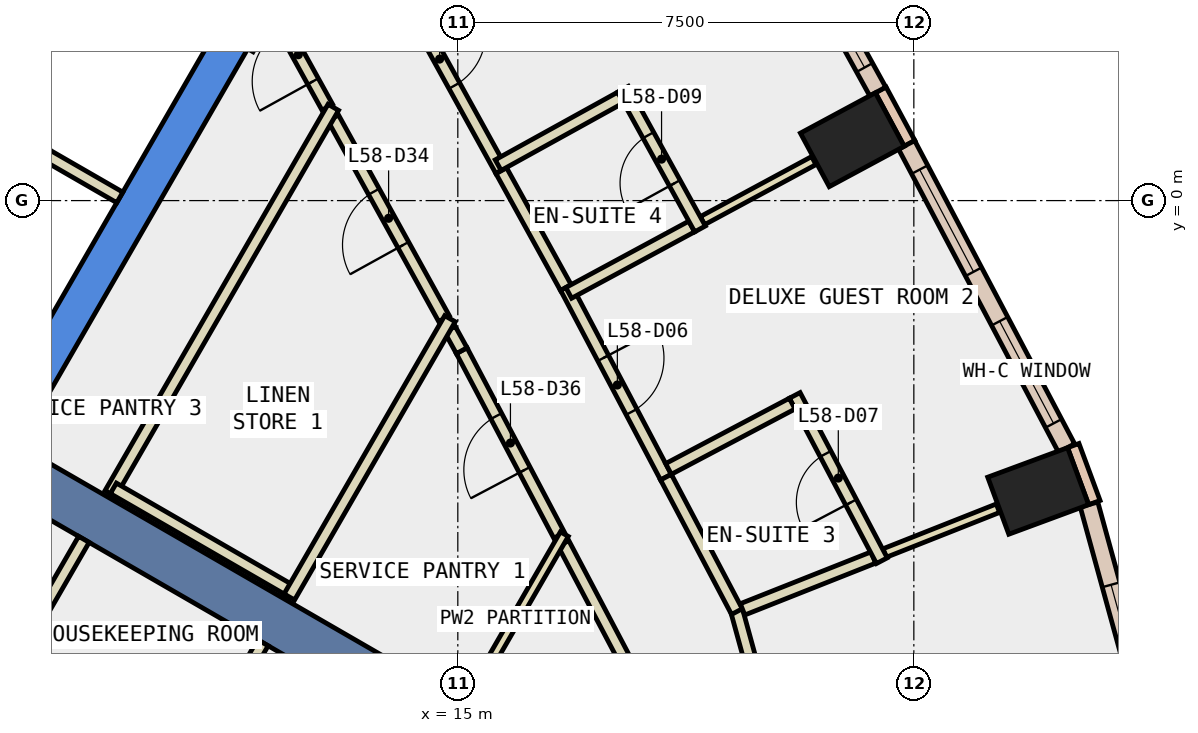
"""IFC4 building model, lengths in metres.
Left out: names, types, materials, properties, quantities, classifications, styles, units other than length and angle.
Written with IfcOpenShell. Run it as: python <this file> out.ifc"""

import sys

from ifc_helpers import new_model, si_unit, direction, frame, frame_2d, origin, origin_2d, place, context, subcontext, project, spatial, polyline, rectangle, outline, extrude, element, fill, save


model = new_model("IFC4")
c1 = context("Model", 3, precision=1e-05, world=origin(), true_north=direction((0.0, 1.0)))
c2 = subcontext(c1, "Body", "Model", "MODEL_VIEW")
j1 = project(units=[si_unit("LENGTHUNIT", "METRE"), si_unit("PLANEANGLEUNIT", "RADIAN")], contexts=[c1])
p1 = place(None, origin())
s1 = spatial("IfcSite", under=j1, at=p1, CompositionType="ELEMENT")
p2 = place(p1, origin())
s2 = spatial("IfcBuilding", under=s1, at=p2, CompositionType="ELEMENT")
p3 = place(p2, frame((0.0, 0.0, 255.8)))
s3 = spatial("IfcBuildingStorey", under=s2, at=p3, CompositionType="ELEMENT", Elevation=255.8)
for number, where, z_axis, x_axis in (
    (1, (24.545, -4.775, -0.34), (0.0, 0.0, 1.0), (-0.347, 0.938, 0.0)),
    (2, (21.488, 1.001, -0.34), (0.0, 0.0, 1.0), (-0.474, 0.881, 0.0)),
):
    element("IfcColumn", number, at=place(p3, frame(where, z_axis=z_axis, x_axis=x_axis)), inside=s3, PredefinedType="COLUMN", context=c2, shape_type="SweptSolid", body=[
        extrude(rectangle(XDim=1.0, YDim=1.4, at=origin_2d()), origin(), (0.0, 0.0, 1.0), 3.6),
    ])
p4 = place(p3, frame((0.0, 0.0, -0.34)))
e3 = element("IfcWall", 3, at=p4, inside=s3, PredefinedType="SHEAR", context=c2, shape_type="SweptSolid", body=[
    extrude(outline(polyline([(5.774, -7.5), (11.547, 2.5), (10.854, 2.5), (5.427, -6.9), (5.774, -7.5)])), origin(), (0.0, 0.0, 1.0), 3.6),
])
p5 = place(p3, frame((7.578, -4.375, -0.34), z_axis=(0.0, 0.0, 1.0), x_axis=(0.866024315419, -0.5000018851, 0.0)))
e4 = element("IfcWall", 4, at=p5, inside=s3, PredefinedType="SHEAR", context=c2, shape_type="SweptSolid", body=[
    extrude(rectangle(XDim=9.0, YDim=0.8, at=frame_2d((4.5, 0.0))), origin(), (0.0, 0.0, 1.0), 3.6),
])
p6 = place(p3, frame((25.469, -4.967, 0.0), z_axis=(0.0, 0.0, 1.0), x_axis=(-0.346892928577, 0.937904737222, 0.0)))
e5 = element("IfcWall", 5, at=p6, inside=s3, PredefinedType="STANDARD", context=c2, shape_type="SweptSolid", body=[
    extrude(rectangle(XDim=1.0, YDim=0.2, at=frame_2d((0.5, 0.0))), origin(), (0.0, 0.0, 1.0), 3.26),
])
p7 = place(p3, frame((22.429, 0.94, 0.0), z_axis=(0.0, 0.0, 1.0), x_axis=(-0.473663196434, 0.88070606694, 0.0)))
e6 = element("IfcWall", 6, at=p7, inside=s3, PredefinedType="STANDARD", context=c2, shape_type="SweptSolid", body=[
    extrude(rectangle(XDim=1.0, YDim=0.2, at=frame_2d((0.5, 0.0))), origin(), (0.0, 0.0, 1.0), 3.26),
])
p8 = place(p3, frame((26.477, -8.987, 0.0), z_axis=(0.0, 0.0, 1.0), x_axis=(-0.264924661919, 0.964269113633, 0.0)))
e7 = element("IfcWall", 7, at=p8, inside=s3, PredefinedType="STANDARD", context=c2, shape_type="SweptSolid", body=[
    extrude(rectangle(XDim=4.137, YDim=0.3, at=frame_2d((2.068, 0.0))), origin(), (0.0, 0.0, 1.0), 3.26),
])
p9 = place(p8, frame((1.368, 0.0, 0.9)))
e8 = element("IfcOpeningElement", 8, at=p9, cuts=e7, PredefinedType="OPENING", context=c2, shape_type="SweptSolid", body=[
    extrude(rectangle(XDim=1.4, YDim=2.0, at=frame_2d((0.7, 1.0))), frame((0.0, 0.16, 0.0), z_axis=(0.0, -1.0, 0.0), x_axis=(1.0, 0.0, 0.0)), (0.0, 0.0, 1.0), 0.32),
])
p10 = place(p3, frame((25.012, -4.07, 0.0), z_axis=(0.0, 0.0, 1.0), x_axis=(-0.466663589714, 0.884434900959, 0.0)))
e9 = element("IfcWall", 9, at=p10, inside=s3, PredefinedType="STANDARD", context=c2, shape_type="SweptSolid", body=[
    extrude(rectangle(XDim=5.638, YDim=0.3, at=frame_2d((2.819, 0.0))), origin(), (0.0, 0.0, 1.0), 3.26),
])
p11 = place(p10, frame((0.459, 0.0, 0.9)))
e10 = element("IfcOpeningElement", 10, at=p11, cuts=e9, PredefinedType="OPENING", context=c2, shape_type="SweptSolid", body=[
    extrude(rectangle(XDim=1.9, YDim=2.0, at=frame_2d((0.95, 1.0))), frame((0.0, 0.16, 0.0), z_axis=(0.0, -1.0, 0.0), x_axis=(1.0, 0.0, 0.0)), (0.0, 0.0, 1.0), 0.32),
])
p12 = place(p10, frame((3.278, 0.0, 0.9)))
e11 = element("IfcOpeningElement", 11, at=p12, cuts=e9, PredefinedType="OPENING", context=c2, shape_type="SweptSolid", body=[
    extrude(rectangle(XDim=1.9, YDim=2.0, at=frame_2d((0.95, 1.0))), frame((0.0, 0.16, 0.0), z_axis=(0.0, -1.0, 0.0), x_axis=(1.0, 0.0, 0.0)), (0.0, 0.0, 1.0), 0.32),
])
p13 = place(p3, frame((21.907, 1.794, 0.0), z_axis=(0.0, 0.0, 1.0), x_axis=(-0.483469062695, 0.875361448441, 0.0)))
e12 = element("IfcWall", 12, at=p13, inside=s3, PredefinedType="STANDARD", context=c2, shape_type="SweptSolid", body=[
    extrude(rectangle(XDim=5.601, YDim=0.3, at=frame_2d((2.801, 0.0))), origin(), (0.0, 0.0, 1.0), 3.26),
])
p14 = place(p13, frame((0.45, 0.0, 0.9)))
e13 = element("IfcOpeningElement", 13, at=p14, cuts=e12, PredefinedType="OPENING", context=c2, shape_type="SweptSolid", body=[
    extrude(rectangle(XDim=1.9, YDim=2.0, at=frame_2d((0.95, 1.0))), frame((0.0, 0.16, 0.0), z_axis=(0.0, -1.0, 0.0), x_axis=(1.0, 0.0, 0.0)), (0.0, 0.0, 1.0), 0.32),
])
p15 = place(p13, frame((3.251, 0.0, 0.9)))
e14 = element("IfcOpeningElement", 14, at=p15, cuts=e12, PredefinedType="OPENING", context=c2, shape_type="SweptSolid", body=[
    extrude(rectangle(XDim=1.9, YDim=2.0, at=frame_2d((0.95, 1.0))), frame((0.0, 0.16, 0.0), z_axis=(0.0, -1.0, 0.0), x_axis=(1.0, 0.0, 0.0)), (0.0, 0.0, 1.0), 0.32),
])
p16 = place(p3, frame((12.854, 1.535, 0.0), z_axis=(0.0, 0.0, 1.0), x_axis=(-0.483730980407, 0.875216738068, 0.0)))
e15 = element("IfcWall", 15, at=p16, inside=s3, PredefinedType="PARTITIONING", context=c2, shape_type="SweptSolid", body=[
    extrude(rectangle(XDim=1.974, YDim=0.2, at=frame_2d((0.987, 0.0))), origin(), (0.0, 0.0, 1.0), 3.26),
])
p17 = place(p16, frame((0.487, 0.0, 0.0)))
e16 = element("IfcOpeningElement", 16, at=p17, cuts=e15, PredefinedType="OPENING", context=c2, shape_type="SweptSolid", body=[
    extrude(rectangle(XDim=1.0, YDim=2.1, at=frame_2d((0.5, 1.05))), frame((0.0, 0.11, 0.0), z_axis=(0.0, -1.0, 0.0), x_axis=(1.0, 0.0, 0.0)), (0.0, 0.0, 1.0), 0.22),
])
p18 = place(p3, frame((11.893, 3.097, 0.0), z_axis=(0.0, 0.0, 1.0), x_axis=(-0.500911294014, -0.865498628265, 0.0)))
e17 = element("IfcWall", 17, at=p18, inside=s3, PredefinedType="PARTITIONING", context=c2, shape_type="SweptSolid", body=[
    extrude(rectangle(XDim=0.693, YDim=0.2, at=frame_2d((0.347, 0.0))), origin(), (0.0, 0.0, 1.0), 3.26),
])
p19 = place(p3, frame((14.773, -1.941, 0.0), z_axis=(0.0, 0.0, 1.0), x_axis=(-0.483431586589, 0.875382145744, 0.0)))
e18 = element("IfcWall", 18, at=p19, inside=s3, PredefinedType="PARTITIONING", context=c2, shape_type="SweptSolid", body=[
    extrude(rectangle(XDim=3.771, YDim=0.2, at=frame_2d((1.885, 0.0))), origin(), (0.0, 0.0, 1.0), 3.26),
])
p20 = place(p19, frame((1.385, 0.0, 0.0)))
e19 = element("IfcOpeningElement", 19, at=p20, cuts=e18, PredefinedType="OPENING", context=c2, shape_type="SweptSolid", body=[
    extrude(rectangle(XDim=1.0, YDim=2.1, at=frame_2d((0.5, 1.05))), frame((0.0, 0.11, 0.0), z_axis=(0.0, -1.0, 0.0), x_axis=(1.0, 0.0, 0.0)), (0.0, 0.0, 1.0), 0.22),
])
p21 = place(p3, frame((16.667, -5.505, 0.0), z_axis=(0.0, 0.0, 1.0), x_axis=(-0.466812680399, 0.884356218624, 0.0)))
e20 = element("IfcWall", 20, at=p21, inside=s3, PredefinedType="PARTITIONING", context=c2, shape_type="SweptSolid", body=[
    extrude(rectangle(XDim=3.434, YDim=0.2, at=frame_2d((1.717, 0.0))), origin(), (0.0, 0.0, 1.0), 3.26),
])
p22 = place(p21, frame((1.217, 0.0, 0.0)))
e21 = element("IfcOpeningElement", 21, at=p22, cuts=e20, PredefinedType="OPENING", context=c2, shape_type="SweptSolid", body=[
    extrude(rectangle(XDim=1.0, YDim=2.1, at=frame_2d((0.5, 1.05))), frame((0.0, 0.11, 0.0), z_axis=(0.0, -1.0, 0.0), x_axis=(1.0, 0.0, 0.0)), (0.0, 0.0, 1.0), 0.22),
])
p23 = place(p3, frame((15.064, -2.468, 0.0), z_axis=(0.0, 0.0, 1.0), x_axis=(-0.482338449744, 0.875984942735, 0.0)))
e22 = element("IfcWall", 22, at=p23, inside=s3, PredefinedType="PARTITIONING", context=c2, shape_type="SweptSolid", body=[
    extrude(rectangle(XDim=0.402, YDim=0.2, at=frame_2d((0.201, 0.0))), origin(), (0.0, 0.0, 1.0), 3.26),
])
p24 = place(p3, frame((17.766, -7.588, 0.0), z_axis=(0.0, 0.0, 1.0), x_axis=(-0.466727344864, 0.884401258228, 0.0)))
e23 = element("IfcWall", 23, at=p24, inside=s3, PredefinedType="PARTITIONING", context=c2, shape_type="SweptSolid", body=[
    extrude(rectangle(XDim=2.205, YDim=0.2, at=frame_2d((1.103, 0.0))), origin(), (0.0, 0.0, 1.0), 3.26),
])
p25 = place(p3, frame((19.564, -6.662, 0.0), z_axis=(0.0, 0.0, 1.0), x_axis=(0.264876135597, -0.96428244451, 0.0)))
e24 = element("IfcWall", 24, at=p25, inside=s3, PredefinedType="PARTITIONING", context=c2, shape_type="SweptSolid", body=[
    extrude(rectangle(XDim=3.077, YDim=0.2, at=frame_2d((1.538, 0.0))), origin(), (0.0, 0.0, 1.0), 3.26),
])
p26 = place(p3, frame((16.778, -1.429, 0.0), z_axis=(0.0, 0.0, 1.0), x_axis=(0.466493865945, -0.884524433261, 0.0)))
e25 = element("IfcWall", 25, at=p26, inside=s3, PredefinedType="PARTITIONING", context=c2, shape_type="SweptSolid", body=[
    extrude(rectangle(XDim=3.526, YDim=0.2, at=frame_2d((1.763, 0.0))), origin(), (0.0, 0.0, 1.0), 3.26),
])
p27 = place(p26, frame((1.313, 0.0, 0.0)))
e26 = element("IfcOpeningElement", 26, at=p27, cuts=e25, PredefinedType="OPENING", context=c2, shape_type="SweptSolid", body=[
    extrude(rectangle(XDim=1.0, YDim=2.1, at=frame_2d((0.5, 1.05))), frame((0.0, 0.11, 0.0), z_axis=(0.0, -1.0, 0.0), x_axis=(1.0, 0.0, 0.0)), (0.0, 0.0, 1.0), 0.22),
])
p28 = place(p3, frame((18.423, -4.548, 0.0), z_axis=(0.0, 0.0, 1.0), x_axis=(0.466792565793, -0.884366835946, 0.0)))
e27 = element("IfcWall", 27, at=p28, inside=s3, PredefinedType="PARTITIONING", context=c2, shape_type="SweptSolid", body=[
    extrude(rectangle(XDim=2.5, YDim=0.2, at=frame_2d((1.25, 0.0))), origin(), (0.0, 0.0, 1.0), 3.26),
])
p29 = place(p3, frame((13.641, 4.246, 0.0), z_axis=(0.0, 0.0, 1.0), x_axis=(0.483405752983, -0.875396411909, 0.0)))
e28 = element("IfcWall", 28, at=p29, inside=s3, PredefinedType="PARTITIONING", context=c2, shape_type="SweptSolid", body=[
    extrude(rectangle(XDim=4.284, YDim=0.2, at=frame_2d((2.142, 0.0))), origin(), (0.0, 0.0, 1.0), 3.26),
])
p30 = place(p29, frame((1.692, 0.0, 0.0)))
e29 = element("IfcOpeningElement", 29, at=p30, cuts=e28, PredefinedType="OPENING", context=c2, shape_type="SweptSolid", body=[
    extrude(rectangle(XDim=1.0, YDim=2.1, at=frame_2d((0.5, 1.05))), frame((0.0, 0.11, 0.0), z_axis=(0.0, -1.0, 0.0), x_axis=(1.0, 0.0, 0.0)), (0.0, 0.0, 1.0), 0.22),
])
p31 = place(p3, frame((15.715, 0.491, 0.0), z_axis=(0.0, 0.0, 1.0), x_axis=(0.483421428323, -0.875387755591, 0.0)))
e30 = element("IfcWall", 30, at=p31, inside=s3, PredefinedType="PARTITIONING", context=c2, shape_type="SweptSolid", body=[
    extrude(rectangle(XDim=2.194, YDim=0.2, at=frame_2d((1.097, 0.0))), origin(), (0.0, 0.0, 1.0), 3.26),
])
p32 = place(p3, frame((8.141, 0.801, 0.0), z_axis=(0.0, 0.0, 1.0), x_axis=(0.866434738017, -0.499290341141, 0.0)))
e31 = element("IfcWall", 31, at=p32, inside=s3, PredefinedType="PARTITIONING", context=c2, shape_type="SweptSolid", body=[
    extrude(rectangle(XDim=1.5, YDim=0.2, at=frame_2d((0.75, 0.0))), origin(), (0.0, 0.0, 1.0), 3.26),
])
p33 = place(p3, frame((7.8, -7.39, 0.0), z_axis=(0.0, 0.0, 1.0), x_axis=(0.499977374825, 0.866038466041, 0.0)))
e32 = element("IfcWall", 32, at=p33, inside=s3, PredefinedType="PARTITIONING", context=c2, shape_type="SweptSolid", body=[
    extrude(rectangle(XDim=2.1, YDim=0.2, at=frame_2d((1.05, 0.0))), origin(), (0.0, 0.0, 1.0), 3.26),
])
p34 = place(p3, frame((9.285, -4.818, 0.0), z_axis=(0.0, 0.0, 1.0), x_axis=(0.499962569651, 0.866047013128, 0.0)))
e33 = element("IfcWall", 33, at=p34, inside=s3, PredefinedType="PARTITIONING", context=c2, shape_type="SweptSolid", body=[
    extrude(rectangle(XDim=7.334, YDim=0.2, at=frame_2d((3.667, 0.0))), origin(), (0.0, 0.0, 1.0), 3.26),
])
p35 = place(p3, frame((9.335, -4.732, 0.0), z_axis=(0.0, 0.0, 1.0), x_axis=(0.866002606077, -0.500039484709, 0.0)))
e34 = element("IfcWall", 34, at=p35, inside=s3, PredefinedType="PARTITIONING", context=c2, shape_type="SweptSolid", body=[
    extrude(rectangle(XDim=3.4, YDim=0.2, at=frame_2d((1.7, 0.0))), origin(), (0.0, 0.0, 1.0), 3.26),
])
p36 = place(p3, frame((11.794, -7.271, 0.0), z_axis=(0.0, 0.0, 1.0), x_axis=(-0.499918457185, -0.866072477433, 0.0)))
e35 = element("IfcWall", 35, at=p36, inside=s3, PredefinedType="PARTITIONING", context=c2, shape_type="SweptSolid", body=[
    extrude(rectangle(XDim=5.607, YDim=0.2, at=frame_2d((2.803, 0.0))), origin(), (0.0, 0.0, 1.0), 3.26),
])
p37 = place(p3, frame((14.871, -1.942, 0.0), z_axis=(0.0, 0.0, 1.0), x_axis=(-0.50000507839, -0.866022471755, 0.0)))
e36 = element("IfcWall", 36, at=p37, inside=s3, PredefinedType="PARTITIONING", context=c2, shape_type="SweptSolid", body=[
    extrude(rectangle(XDim=5.284, YDim=0.2, at=frame_2d((2.642, 0.0))), origin(), (0.0, 0.0, 1.0), 3.26),
])
p38 = place(p3, frame((16.752, -5.485, 0.0), z_axis=(0.0, 0.0, 1.0), x_axis=(-0.499988848364, -0.866031842089, 0.0)))
e37 = element("IfcWall", 37, at=p38, inside=s3, PredefinedType="PARTITIONING", context=c2, shape_type="SweptSolid", body=[
    extrude(rectangle(XDim=3.226, YDim=0.15, at=frame_2d((1.613, 0.0))), origin(), (0.0, 0.0, 1.0), 3.26),
])
p39 = place(p3, frame((22.02, -5.796, 0.0), z_axis=(0.0, 0.0, 1.0), x_axis=(0.929915172208, 0.367774078066, 0.0)))
e38 = element("IfcWall", 38, at=p39, inside=s3, PredefinedType="PARTITIONING", context=c2, shape_type="SweptSolid", body=[
    extrude(rectangle(XDim=2.003, YDim=0.15, at=frame_2d((1.002, 0.0))), origin(), (0.0, 0.0, 1.0), 3.26),
])
p40 = place(p3, frame((19.683, -6.722, 0.0), z_axis=(0.0, 0.0, 1.0), x_axis=(0.929744903847, 0.368204309821, 0.0)))
e39 = element("IfcWall", 39, at=p40, inside=s3, PredefinedType="PARTITIONING", context=c2, shape_type="SweptSolid", body=[
    extrude(rectangle(XDim=2.313, YDim=0.2, at=frame_2d((1.157, 0.0))), origin(), (0.0, 0.0, 1.0), 3.26),
])
p41 = place(p3, frame((21.974, -5.922, 0.0), z_axis=(0.0, 0.0, 1.0), x_axis=(-0.466401249432, 0.88457327256, 0.0)))
e40 = element("IfcWall", 40, at=p41, inside=s3, PredefinedType="PARTITIONING", context=c2, shape_type="SweptSolid", body=[
    extrude(rectangle(XDim=3.073, YDim=0.2, at=frame_2d((1.536, 0.0))), origin(), (0.0, 0.0, 1.0), 3.26),
])
p42 = place(p41, frame((1.086, 0.0, 0.0)))
e41 = element("IfcOpeningElement", 41, at=p42, cuts=e40, PredefinedType="OPENING", context=c2, shape_type="SweptSolid", body=[
    extrude(rectangle(XDim=0.9, YDim=2.1, at=frame_2d((0.45, 1.05))), frame((0.0, 0.11, 0.0), z_axis=(0.0, -1.0, 0.0), x_axis=(1.0, 0.0, 0.0)), (0.0, 0.0, 1.0), 0.22),
])
p43 = place(p3, frame((20.499, -3.339, 0.0), z_axis=(0.0, 0.0, 1.0), x_axis=(-0.884293452572, -0.466931568583, 0.0)))
e42 = element("IfcWall", 42, at=p43, inside=s3, PredefinedType="PARTITIONING", context=c2, shape_type="SweptSolid", body=[
    extrude(rectangle(XDim=2.3, YDim=0.2, at=frame_2d((1.15, 0.0))), origin(), (0.0, 0.0, 1.0), 3.26),
])
p44 = place(p3, frame((19.023, -0.33, 0.0), z_axis=(0.0, 0.0, 1.0), x_axis=(0.880158309515, 0.474680261009, 0.0)))
e43 = element("IfcWall", 43, at=p44, inside=s3, PredefinedType="PARTITIONING", context=c2, shape_type="SweptSolid", body=[
    extrude(rectangle(XDim=2.082, YDim=0.15, at=frame_2d((1.041, 0.0))), origin(), (0.0, 0.0, 1.0), 3.26),
])
p45 = place(p3, frame((16.824, -1.518, 0.0), z_axis=(0.0, 0.0, 1.0), x_axis=(0.87996932648, 0.475030508972, 0.0)))
e44 = element("IfcWall", 44, at=p45, inside=s3, PredefinedType="PARTITIONING", context=c2, shape_type="SweptSolid", body=[
    extrude(rectangle(XDim=2.299, YDim=0.2, at=frame_2d((1.149, 0.0))), origin(), (0.0, 0.0, 1.0), 3.26),
])
p46 = place(p3, frame((18.984, -0.466, 0.0), z_axis=(0.0, 0.0, 1.0), x_axis=(-0.482922337539, 0.875663186337, 0.0)))
e45 = element("IfcWall", 45, at=p46, inside=s3, PredefinedType="PARTITIONING", context=c2, shape_type="SweptSolid", body=[
    extrude(rectangle(XDim=2.623, YDim=0.2, at=frame_2d((1.312, 0.0))), origin(), (0.0, 0.0, 1.0), 3.26),
])
p47 = place(p46, frame((0.861, 0.0, 0.0)))
e46 = element("IfcOpeningElement", 46, at=p47, cuts=e45, PredefinedType="OPENING", context=c2, shape_type="SweptSolid", body=[
    extrude(rectangle(XDim=0.9, YDim=2.1, at=frame_2d((0.45, 1.05))), frame((0.0, 0.11, 0.0), z_axis=(0.0, -1.0, 0.0), x_axis=(1.0, 0.0, 0.0)), (0.0, 0.0, 1.0), 0.22),
])
p48 = place(p3, frame((17.677, 1.695, 0.0), z_axis=(0.0, 0.0, 1.0), x_axis=(-0.875306576455, -0.483568399727, 0.0)))
e47 = element("IfcWall", 47, at=p48, inside=s3, PredefinedType="PARTITIONING", context=c2, shape_type="SweptSolid", body=[
    extrude(rectangle(XDim=2.3, YDim=0.2, at=frame_2d((1.15, 0.0))), origin(), (0.0, 0.0, 1.0), 3.26),
])
p49 = place(p3, frame((4.806, 1.176, 0.0), z_axis=(0.0, 0.0, 1.0), x_axis=(0.866059941101, 0.499940174841, 0.0)))
e48 = element("IfcWall", 48, at=p49, inside=s3, PredefinedType="STANDARD", context=c2, shape_type="SweptSolid", body=[
    extrude(rectangle(XDim=4.4, YDim=0.2, at=frame_2d((2.2, 0.0))), origin(), (0.0, 0.0, 1.0), 3.26),
])
p50 = place(p49, frame((2.4, 0.0, 0.0)))
e49 = element("IfcOpeningElement", 49, at=p50, cuts=e48, PredefinedType="OPENING", context=c2, shape_type="SweptSolid", body=[
    extrude(rectangle(XDim=1.1, YDim=2.2, at=frame_2d((0.55, 1.1))), frame((0.0, 0.11, 0.0), z_axis=(0.0, -1.0, 0.0), x_axis=(1.0, 0.0, 0.0)), (0.0, 0.0, 1.0), 0.22),
])
p51 = place(p9, origin())
e50 = element("IfcWindow", 50, at=p51, inside=s3, PartitioningType="SINGLE_PANEL", PredefinedType="WINDOW", context=c2, shape_type="SweptSolid", body=[
    extrude(rectangle(XDim=1.4, YDim=2.0, at=frame_2d((0.7, 1.0))), frame((0.0, 0.03, 0.0), z_axis=(0.0, -1.0, 0.0), x_axis=(1.0, 0.0, 0.0)), (0.0, 0.0, 1.0), 0.06),
])
fill(e8, e50)
p52 = place(p11, origin())
e51 = element("IfcWindow", 51, at=p52, inside=s3, PartitioningType="SINGLE_PANEL", PredefinedType="WINDOW", context=c2, shape_type="SweptSolid", body=[
    extrude(rectangle(XDim=1.9, YDim=2.0, at=frame_2d((0.95, 1.0))), frame((0.0, 0.03, 0.0), z_axis=(0.0, -1.0, 0.0), x_axis=(1.0, 0.0, 0.0)), (0.0, 0.0, 1.0), 0.06),
])
fill(e10, e51)
p53 = place(p12, origin())
e52 = element("IfcWindow", 52, at=p53, inside=s3, PartitioningType="SINGLE_PANEL", PredefinedType="WINDOW", context=c2, shape_type="SweptSolid", body=[
    extrude(rectangle(XDim=1.9, YDim=2.0, at=frame_2d((0.95, 1.0))), frame((0.0, 0.03, 0.0), z_axis=(0.0, -1.0, 0.0), x_axis=(1.0, 0.0, 0.0)), (0.0, 0.0, 1.0), 0.06),
])
fill(e11, e52)
p54 = place(p14, origin())
e53 = element("IfcWindow", 53, at=p54, inside=s3, PartitioningType="SINGLE_PANEL", PredefinedType="WINDOW", context=c2, shape_type="SweptSolid", body=[
    extrude(rectangle(XDim=1.9, YDim=2.0, at=frame_2d((0.95, 1.0))), frame((0.0, 0.03, 0.0), z_axis=(0.0, -1.0, 0.0), x_axis=(1.0, 0.0, 0.0)), (0.0, 0.0, 1.0), 0.06),
])
fill(e13, e53)
p55 = place(p27, origin())
e54 = element("IfcDoor", 54, at=p55, inside=s3, OperationType="SINGLE_SWING_RIGHT", PredefinedType="DOOR", context=c2, shape_type="SweptSolid", body=[
    extrude(rectangle(XDim=1.0, YDim=2.1, at=frame_2d((0.5, 1.05))), frame((0.0, 0.025, 0.0), z_axis=(0.0, -1.0, 0.0), x_axis=(1.0, 0.0, 0.0)), (0.0, 0.0, 1.0), 0.05),
])
fill(e26, e54)
p56 = place(p42, origin())
e55 = element("IfcDoor", 55, at=p56, inside=s3, OperationType="SINGLE_SWING_RIGHT", PredefinedType="DOOR", context=c2, shape_type="SweptSolid", body=[
    extrude(rectangle(XDim=0.9, YDim=2.1, at=frame_2d((0.45, 1.05))), frame((0.0, 0.025, 0.0), z_axis=(0.0, -1.0, 0.0), x_axis=(1.0, 0.0, 0.0)), (0.0, 0.0, 1.0), 0.05),
])
fill(e41, e55)
p57 = place(p30, origin())
e56 = element("IfcDoor", 56, at=p57, inside=s3, OperationType="SINGLE_SWING_RIGHT", PredefinedType="DOOR", context=c2, shape_type="SweptSolid", body=[
    extrude(rectangle(XDim=1.0, YDim=2.1, at=frame_2d((0.5, 1.05))), frame((0.0, 0.025, 0.0), z_axis=(0.0, -1.0, 0.0), x_axis=(1.0, 0.0, 0.0)), (0.0, 0.0, 1.0), 0.05),
])
fill(e29, e56)
p58 = place(p47, origin())
e57 = element("IfcDoor", 57, at=p58, inside=s3, OperationType="SINGLE_SWING_LEFT", PredefinedType="DOOR", context=c2, shape_type="SweptSolid", body=[
    extrude(rectangle(XDim=0.9, YDim=2.1, at=frame_2d((0.45, 1.05))), frame((0.0, 0.025, 0.0), z_axis=(0.0, -1.0, 0.0), x_axis=(1.0, 0.0, 0.0)), (0.0, 0.0, 1.0), 0.05),
])
fill(e46, e57)
p59 = place(p20, origin())
e58 = element("IfcDoor", 58, at=p59, inside=s3, OperationType="SINGLE_SWING_LEFT", PredefinedType="DOOR", context=c2, shape_type="SweptSolid", body=[
    extrude(rectangle(XDim=1.0, YDim=2.1, at=frame_2d((0.5, 1.05))), frame((0.0, 0.025, 0.0), z_axis=(0.0, -1.0, 0.0), x_axis=(1.0, 0.0, 0.0)), (0.0, 0.0, 1.0), 0.05),
])
fill(e19, e58)
p60 = place(p22, origin())
e59 = element("IfcDoor", 59, at=p60, inside=s3, OperationType="SINGLE_SWING_RIGHT", PredefinedType="DOOR", context=c2, shape_type="SweptSolid", body=[
    extrude(rectangle(XDim=1.0, YDim=2.1, at=frame_2d((0.5, 1.05))), frame((0.0, 0.025, 0.0), z_axis=(0.0, -1.0, 0.0), x_axis=(1.0, 0.0, 0.0)), (0.0, 0.0, 1.0), 0.05),
])
fill(e21, e59)
p61 = place(p17, origin())
e60 = element("IfcDoor", 60, at=p61, inside=s3, OperationType="SINGLE_SWING_LEFT", PredefinedType="DOOR", context=c2, shape_type="SweptSolid", body=[
    extrude(rectangle(XDim=1.0, YDim=2.1, at=frame_2d((0.5, 1.05))), frame((0.0, 0.025, 0.0), z_axis=(0.0, -1.0, 0.0), x_axis=(1.0, 0.0, 0.0)), (0.0, 0.0, 1.0), 0.05),
])
fill(e16, e60)
save(model, sys.argv[1])
